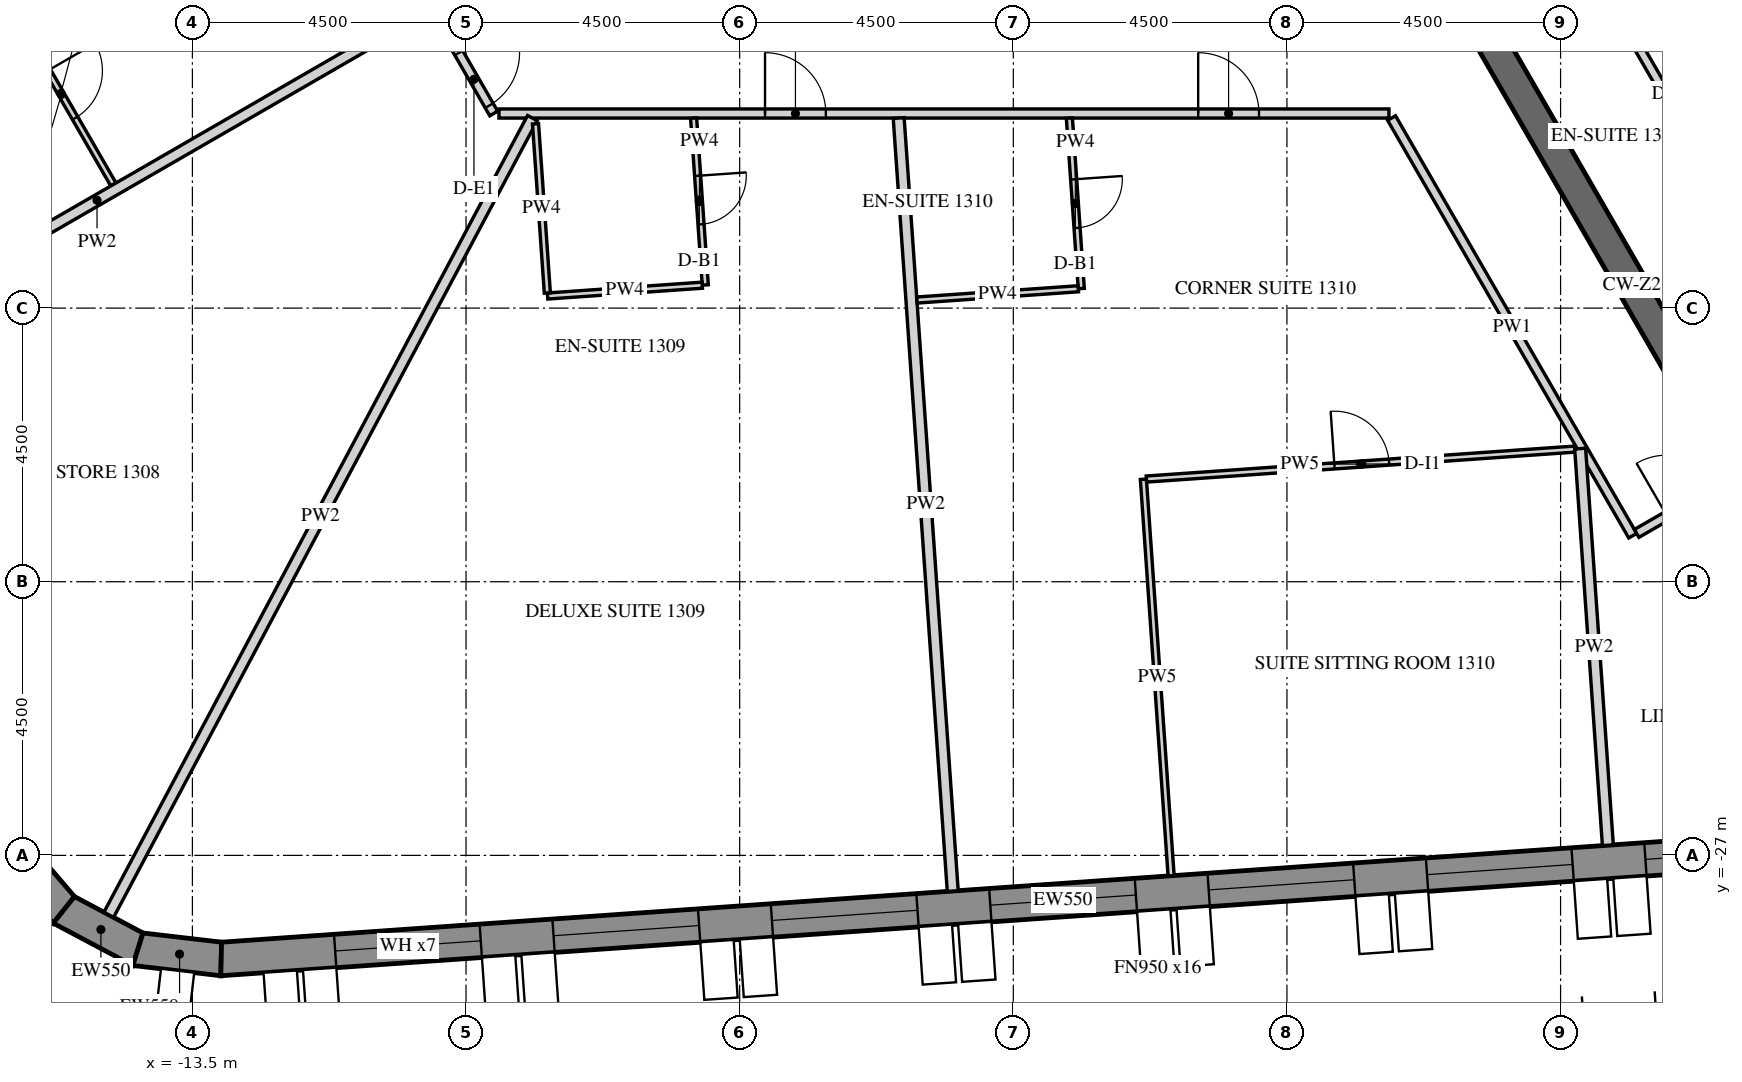
"""IFC4 building model, lengths in metres.
Left out: names, types, materials, properties, quantities, classifications, styles, units other than length and angle.
Written with IfcOpenShell. Run it as: python <this file> out.ifc"""

import sys

from ifc_helpers import new_model, si_unit, direction, frame, frame_2d, origin, place, context, subcontext, project, spatial, polyline, rectangle, outline, extrude, element, fill, save


model = new_model("IFC4")
c1 = context("Model", 3, precision=1e-05, world=origin(), true_north=direction((0.0, 1.0)))
c2 = subcontext(c1, "Body", "Model", "MODEL_VIEW")
j1 = project(units=[si_unit("LENGTHUNIT", "METRE"), si_unit("PLANEANGLEUNIT", "RADIAN")], contexts=[c1])
p1 = place(None, origin())
s1 = spatial("IfcSite", under=j1, at=p1, CompositionType="ELEMENT")
p2 = place(p1, origin())
s2 = spatial("IfcBuilding", under=s1, at=p2, CompositionType="ELEMENT")
p3 = place(p2, frame((0.0, 0.0, 176.1)))
s3 = spatial("IfcBuildingStorey", under=s2, at=p3, CompositionType="ELEMENT", Elevation=176.1)
p4 = place(p3, frame((-16.512, -26.85, -0.15), z_axis=(0.0, 0.0, 1.0), x_axis=(0.651621950847, -0.758543890078, 0.0)))
e1 = element("IfcWall", 1, at=p4, inside=s3, PredefinedType="SOLIDWALL", context=c2, shape_type="SweptSolid", body=[
    extrude(outline(polyline([(-0.026, -0.275), (1.431, -0.275), (1.327, 0.275), (0.026, 0.275), (-0.026, -0.275)])), origin(), (0.0, 0.0, 1.0), 3.9),
])
p5 = place(p3, frame((-15.614, -27.896, -0.15), z_axis=(0.0, 0.0, 1.0), x_axis=(0.882994189209, -0.469383917304, 0.0)))
e2 = element("IfcWall", 2, at=p5, inside=s3, PredefinedType="SOLIDWALL", context=c2, shape_type="SweptSolid", body=[
    extrude(outline(polyline([(-0.052, -0.275), (1.431, -0.275), (1.327, 0.275), (0.052, 0.275), (-0.052, -0.275)])), origin(), (0.0, 0.0, 1.0), 3.9),
])
p6 = place(p3, frame((-14.396, -28.543, -0.15), z_axis=(0.0, 0.0, 1.0), x_axis=(0.993232537394, -0.11614269956, 0.0)))
e3 = element("IfcWall", 3, at=p6, inside=s3, PredefinedType="SOLIDWALL", context=c2, shape_type="SweptSolid", body=[
    extrude(outline(polyline([(-0.052, -0.275), (1.405, -0.275), (1.353, 0.275), (0.052, 0.275), (-0.052, -0.275)])), origin(), (0.0, 0.0, 1.0), 3.9),
])
p7 = place(p3, frame((-13.026, -28.704, -0.15), z_axis=(0.0, 0.0, 1.0), x_axis=(0.99756406806, 0.069756219185, 0.0)))
e4 = element("IfcWall", 4, at=p7, inside=s3, PredefinedType="SOLIDWALL", context=c2, shape_type="SweptSolid", body=[
    extrude(outline(polyline([(-0.026, -0.275), (27.78, -0.275), (27.735, 0.275), (0.026, 0.275), (-0.026, -0.275)])), origin(), (0.0, 0.0, 1.0), 3.9),
])
p8 = place(p7, frame((1.879, 0.0, 1.05)))
e5 = element("IfcOpeningElement", 5, at=p8, cuts=e4, PredefinedType="OPENING", context=c2, shape_type="SweptSolid", body=[
    extrude(rectangle(XDim=2.4, YDim=2.4, at=frame_2d((1.2, 1.2))), frame((0.0, 0.285, 0.0), z_axis=(0.0, -1.0, 0.0), x_axis=(1.0, 0.0, 0.0)), (0.0, 0.0, 1.0), 0.57),
])
p9 = place(p7, frame((5.479, 0.0, 1.05)))
e6 = element("IfcOpeningElement", 6, at=p9, cuts=e4, PredefinedType="OPENING", context=c2, shape_type="SweptSolid", body=[
    extrude(rectangle(XDim=2.4, YDim=2.4, at=frame_2d((1.2, 1.2))), frame((0.0, 0.285, 0.0), z_axis=(0.0, -1.0, 0.0), x_axis=(1.0, 0.0, 0.0)), (0.0, 0.0, 1.0), 0.57),
])
p10 = place(p7, frame((9.079, 0.0, 1.05)))
e7 = element("IfcOpeningElement", 7, at=p10, cuts=e4, PredefinedType="OPENING", context=c2, shape_type="SweptSolid", body=[
    extrude(rectangle(XDim=2.4, YDim=2.4, at=frame_2d((1.2, 1.2))), frame((0.0, 0.285, 0.0), z_axis=(0.0, -1.0, 0.0), x_axis=(1.0, 0.0, 0.0)), (0.0, 0.0, 1.0), 0.57),
])
p11 = place(p7, frame((12.679, 0.0, 1.05)))
e8 = element("IfcOpeningElement", 8, at=p11, cuts=e4, PredefinedType="OPENING", context=c2, shape_type="SweptSolid", body=[
    extrude(rectangle(XDim=2.4, YDim=2.4, at=frame_2d((1.2, 1.2))), frame((0.0, 0.285, 0.0), z_axis=(0.0, -1.0, 0.0), x_axis=(1.0, 0.0, 0.0)), (0.0, 0.0, 1.0), 0.57),
])
p12 = place(p7, frame((16.279, 0.0, 1.05)))
e9 = element("IfcOpeningElement", 9, at=p12, cuts=e4, PredefinedType="OPENING", context=c2, shape_type="SweptSolid", body=[
    extrude(rectangle(XDim=2.4, YDim=2.4, at=frame_2d((1.2, 1.2))), frame((0.0, 0.285, 0.0), z_axis=(0.0, -1.0, 0.0), x_axis=(1.0, 0.0, 0.0)), (0.0, 0.0, 1.0), 0.57),
])
p13 = place(p7, frame((19.879, 0.0, 1.05)))
e10 = element("IfcOpeningElement", 10, at=p13, cuts=e4, PredefinedType="OPENING", context=c2, shape_type="SweptSolid", body=[
    extrude(rectangle(XDim=2.4, YDim=2.4, at=frame_2d((1.2, 1.2))), frame((0.0, 0.285, 0.0), z_axis=(0.0, -1.0, 0.0), x_axis=(1.0, 0.0, 0.0)), (0.0, 0.0, 1.0), 0.57),
])
p14 = place(p7, frame((23.479, 0.0, 1.05)))
e11 = element("IfcOpeningElement", 11, at=p14, cuts=e4, PredefinedType="OPENING", context=c2, shape_type="SweptSolid", body=[
    extrude(rectangle(XDim=2.4, YDim=2.4, at=frame_2d((1.2, 1.2))), frame((0.0, 0.285, 0.0), z_axis=(0.0, -1.0, 0.0), x_axis=(1.0, 0.0, 0.0)), (0.0, 0.0, 1.0), 0.57),
])
p15 = place(p3, frame((7.506, -13.0, -0.15), z_axis=(0.0, 0.0, 1.0), x_axis=(0.499988271576, -0.866032175087, 0.0)))
e12 = element("IfcWall", 12, at=p15, inside=s3, PredefinedType="SHEAR", context=c2, shape_type="SweptSolid", body=[
    extrude(rectangle(XDim=15.424, YDim=0.5, at=frame_2d((7.712, 0.0))), origin(), (0.0, 0.0, 1.0), 3.9),
])
p16 = place(p15, frame((6.812, 0.0, 0.15)))
e13 = element("IfcOpeningElement", 13, at=p16, cuts=e12, PredefinedType="OPENING", context=c2, shape_type="SweptSolid", body=[
    extrude(rectangle(XDim=1.8, YDim=2.4, at=frame_2d((0.9, 1.2))), frame((0.0, 0.26, 0.0), z_axis=(0.0, -1.0, 0.0), x_axis=(1.0, 0.0, 0.0)), (0.0, 0.0, 1.0), 0.52),
])
p17 = place(p3, frame((-14.921, -3.757, 0.0), z_axis=(0.0, 0.0, 1.0), x_axis=(0.500001980452, -0.866024260367, 0.0)))
e14 = element("IfcWall", 14, at=p17, inside=s3, PredefinedType="PARTITIONING", context=c2, shape_type="SweptSolid", body=[
    extrude(rectangle(XDim=12.752, YDim=0.15, at=frame_2d((6.376, 0.0))), origin(), (0.0, 0.0, 1.0), 2.988),
])
p18 = place(p17, frame((6.225, 0.0, 0.0)))
e15 = element("IfcOpeningElement", 15, at=p18, cuts=e14, PredefinedType="OPENING", context=c2, shape_type="SweptSolid", body=[
    extrude(rectangle(XDim=1.0, YDim=2.1, at=frame_2d((0.5, 1.05))), frame((0.0, 0.085, 0.0), z_axis=(0.0, -1.0, 0.0), x_axis=(1.0, 0.0, 0.0)), (0.0, 0.0, 1.0), 0.17),
])
p19 = place(p17, frame((11.602, 0.0, 0.0)))
e16 = element("IfcOpeningElement", 16, at=p19, cuts=e14, PredefinedType="OPENING", context=c2, shape_type="SweptSolid", body=[
    extrude(rectangle(XDim=1.0, YDim=2.1, at=frame_2d((0.5, 1.05))), frame((0.0, 0.085, 0.0), z_axis=(0.0, -1.0, 0.0), x_axis=(1.0, 0.0, 0.0)), (0.0, 0.0, 1.0), 0.17),
])
p20 = place(p3, frame((-8.458, -14.8, 0.0), z_axis=(0.0, 0.0, 1.0), x_axis=(1.0, 0.0, 0.0)))
e17 = element("IfcWall", 17, at=p20, inside=s3, PredefinedType="PARTITIONING", context=c2, shape_type="SweptSolid", body=[
    extrude(rectangle(XDim=14.636, YDim=0.15, at=frame_2d((7.318, 0.0))), origin(), (0.0, 0.0, 1.0), 2.988),
])
p21 = place(p20, frame((4.375, 0.0, 0.0)))
e18 = element("IfcOpeningElement", 18, at=p21, cuts=e17, PredefinedType="OPENING", context=c2, shape_type="SweptSolid", body=[
    extrude(rectangle(XDim=1.0, YDim=2.1, at=frame_2d((0.5, 1.05))), frame((0.0, 0.085, 0.0), z_axis=(0.0, -1.0, 0.0), x_axis=(1.0, 0.0, 0.0)), (0.0, 0.0, 1.0), 0.17),
])
p22 = place(p20, frame((11.499, 0.0, 0.0)))
e19 = element("IfcOpeningElement", 19, at=p22, cuts=e17, PredefinedType="OPENING", context=c2, shape_type="SweptSolid", body=[
    extrude(rectangle(XDim=1.0, YDim=2.1, at=frame_2d((0.5, 1.05))), frame((0.0, 0.085, 0.0), z_axis=(0.0, -1.0, 0.0), x_axis=(1.0, 0.0, 0.0)), (0.0, 0.0, 1.0), 0.17),
])
p23 = place(p3, frame((6.221, -14.875, 0.0), z_axis=(0.0, 0.0, 1.0), x_axis=(0.499989830942, -0.866031274813, 0.0)))
e20 = element("IfcWall", 20, at=p23, inside=s3, PredefinedType="PARTITIONING", context=c2, shape_type="SweptSolid", body=[
    extrude(rectangle(XDim=7.93, YDim=0.15, at=frame_2d((3.965, 0.0))), origin(), (0.0, 0.0, 1.0), 2.988),
])
p24 = place(p3, frame((10.251, -21.705, 0.0), z_axis=(0.0, 0.0, 1.0), x_axis=(0.866013532718, 0.500020560727, 0.0)))
e21 = element("IfcWall", 21, at=p24, inside=s3, PredefinedType="PARTITIONING", context=c2, shape_type="SweptSolid", body=[
    extrude(rectangle(XDim=1.725, YDim=0.15, at=frame_2d((0.863, 0.0))), origin(), (0.0, 0.0, 1.0), 2.988),
])
p25 = place(p24, frame((0.575, 0.0, 0.0)))
e22 = element("IfcOpeningElement", 22, at=p25, cuts=e21, PredefinedType="OPENING", context=c2, shape_type="SweptSolid", body=[
    extrude(rectangle(XDim=1.0, YDim=2.1, at=frame_2d((0.5, 1.05))), frame((0.0, 0.085, 0.0), z_axis=(0.0, -1.0, 0.0), x_axis=(1.0, 0.0, 0.0)), (0.0, 0.0, 1.0), 0.17),
])
p26 = place(p3, frame((13.699, -19.628, 0.0), z_axis=(0.0, 0.0, 1.0), x_axis=(-0.499998968938, 0.866025999068, 0.0)))
e23 = element("IfcWall", 23, at=p26, inside=s3, PredefinedType="PARTITIONING", context=c2, shape_type="SweptSolid", body=[
    extrude(rectangle(XDim=7.592, YDim=0.15, at=frame_2d((3.796, 0.0))), origin(), (0.0, 0.0, 1.0), 2.988),
])
p27 = place(p26, frame((2.233, 0.0, 0.0)))
e24 = element("IfcOpeningElement", 24, at=p27, cuts=e23, PredefinedType="OPENING", context=c2, shape_type="SweptSolid", body=[
    extrude(rectangle(XDim=1.0, YDim=2.1, at=frame_2d((0.5, 1.05))), frame((0.0, 0.085, 0.0), z_axis=(0.0, -1.0, 0.0), x_axis=(1.0, 0.0, 0.0)), (0.0, 0.0, 1.0), 0.17),
])
p28 = place(p3, frame((-16.529, -12.97, 0.0), z_axis=(0.0, 0.0, 1.0), x_axis=(0.499978980201, -0.866037539231, 0.0)))
e25 = element("IfcWall", 25, at=p28, inside=s3, PredefinedType="PARTITIONING", context=c2, shape_type="SweptSolid", body=[
    extrude(rectangle(XDim=3.46, YDim=0.1, at=frame_2d((1.73, 0.0))), origin(), (0.0, 0.0, 1.0), 2.988),
])
p29 = place(p28, frame((1.3, 0.0, 0.0)))
e26 = element("IfcOpeningElement", 26, at=p29, cuts=e25, PredefinedType="OPENING", context=c2, shape_type="SweptSolid", body=[
    extrude(rectangle(XDim=0.9, YDim=2.1, at=frame_2d((0.45, 1.05))), frame((0.0, 0.06, 0.0), z_axis=(0.0, -1.0, 0.0), x_axis=(1.0, 0.0, 0.0)), (0.0, 0.0, 1.0), 0.12),
])
p30 = place(p3, frame((-20.513, -19.37, 0.0), z_axis=(0.0, 0.0, 1.0), x_axis=(0.866019402111, 0.500010395058, 0.0)))
e27 = element("IfcWall", 27, at=p30, inside=s3, PredefinedType="PARTITIONING", context=c2, shape_type="SweptSolid", body=[
    extrude(rectangle(XDim=12.575, YDim=0.18, at=frame_2d((6.288, 0.0))), origin(), (0.0, 0.0, 1.0), 2.988),
])
p31 = place(p3, frame((-14.876, -27.977, 0.0), z_axis=(0.0, 0.0, 1.0), x_axis=(0.469475175214, 0.882945672088, 0.0)))
e28 = element("IfcWall", 28, at=p31, inside=s3, PredefinedType="PARTITIONING", context=c2, shape_type="SweptSolid", body=[
    extrude(rectangle(XDim=14.839, YDim=0.18, at=frame_2d((7.419, 0.0))), origin(), (0.0, 0.0, 1.0), 2.988),
])
p32 = place(p3, frame((-5.258, -14.875, 0.0), z_axis=(0.0, 0.0, 1.0), x_axis=(0.069828244755, -0.997559028947, 0.0)))
e29 = element("IfcWall", 29, at=p32, inside=s3, PredefinedType="PARTITIONING", context=c2, shape_type="SweptSolid", body=[
    extrude(rectangle(XDim=2.752, YDim=0.1, at=frame_2d((1.376, 0.0))), origin(), (0.0, 0.0, 1.0), 2.988),
])
p33 = place(p32, frame((0.952, 0.0, 0.0)))
e30 = element("IfcOpeningElement", 30, at=p33, cuts=e29, PredefinedType="OPENING", context=c2, shape_type="SweptSolid", body=[
    extrude(rectangle(XDim=0.8, YDim=2.1, at=frame_2d((0.4, 1.05))), frame((0.0, 0.06, 0.0), z_axis=(0.0, -1.0, 0.0), x_axis=(1.0, 0.0, 0.0)), (0.0, 0.0, 1.0), 0.12),
])
p34 = place(p3, frame((-5.116, -17.623, 0.0), z_axis=(0.0, 0.0, 1.0), x_axis=(-0.997561167558, -0.069797686069, 0.0)))
e31 = element("IfcWall", 31, at=p34, inside=s3, PredefinedType="PARTITIONING", context=c2, shape_type="SweptSolid", body=[
    extrude(rectangle(XDim=2.55, YDim=0.1, at=frame_2d((1.275, 0.0))), origin(), (0.0, 0.0, 1.0), 2.988),
])
p35 = place(p3, frame((-7.663, -17.751, 0.0), z_axis=(0.0, 0.0, 1.0), x_axis=(-0.069778595312, 0.997562503123, 0.0)))
e32 = element("IfcWall", 32, at=p35, inside=s3, PredefinedType="PARTITIONING", context=c2, shape_type="SweptSolid", body=[
    extrude(rectangle(XDim=2.789, YDim=0.1, at=frame_2d((1.394, 0.0))), origin(), (0.0, 0.0, 1.0), 2.988),
])
p36 = place(p3, frame((-0.996, -27.587, 0.0), z_axis=(0.0, 0.0, 1.0), x_axis=(-0.069758774678, 0.99756388936, 0.0)))
e33 = element("IfcWall", 33, at=p36, inside=s3, PredefinedType="PARTITIONING", context=c2, shape_type="SweptSolid", body=[
    extrude(rectangle(XDim=12.743, YDim=0.18, at=frame_2d((6.371, 0.0))), origin(), (0.0, 0.0, 1.0), 2.988),
])
p37 = place(p3, frame((0.922, -14.875, 0.0), z_axis=(0.0, 0.0, 1.0), x_axis=(0.069759103431, -0.997563866371, 0.0)))
e34 = element("IfcWall", 34, at=p37, inside=s3, PredefinedType="PARTITIONING", context=c2, shape_type="SweptSolid", body=[
    extrude(rectangle(XDim=2.81, YDim=0.1, at=frame_2d((1.405, 0.0))), origin(), (0.0, 0.0, 1.0), 2.988),
])
p38 = place(p37, frame((1.01, 0.0, 0.0)))
e35 = element("IfcOpeningElement", 35, at=p38, cuts=e34, PredefinedType="OPENING", context=c2, shape_type="SweptSolid", body=[
    extrude(rectangle(XDim=0.8, YDim=2.1, at=frame_2d((0.4, 1.05))), frame((0.0, 0.06, 0.0), z_axis=(0.0, -1.0, 0.0), x_axis=(1.0, 0.0, 0.0)), (0.0, 0.0, 1.0), 0.12),
])
p39 = place(p3, frame((1.068, -17.682, 0.0), z_axis=(0.0, 0.0, 1.0), x_axis=(-0.997564270717, -0.069753320981, 0.0)))
e36 = element("IfcWall", 36, at=p39, inside=s3, PredefinedType="PARTITIONING", context=c2, shape_type="SweptSolid", body=[
    extrude(rectangle(XDim=2.66, YDim=0.1, at=frame_2d((1.33, 0.0))), origin(), (0.0, 0.0, 1.0), 2.988),
])
p40 = place(p3, frame((2.595, -27.335, 0.0), z_axis=(0.0, 0.0, 1.0), x_axis=(-0.069771144576, 0.997563024267, 0.0)))
e37 = element("IfcWall", 37, at=p40, inside=s3, PredefinedType="PARTITIONING", context=c2, shape_type="SweptSolid", body=[
    extrude(rectangle(XDim=6.536, YDim=0.1, at=frame_2d((3.268, 0.0))), origin(), (0.0, 0.0, 1.0), 2.988),
])
p41 = place(p3, frame((2.189, -20.812, 0.0), z_axis=(0.0, 0.0, 1.0), x_axis=(0.997564480369, 0.06975032263, 0.0)))
e38 = element("IfcWall", 38, at=p41, inside=s3, PredefinedType="PARTITIONING", context=c2, shape_type="SweptSolid", body=[
    extrude(rectangle(XDim=7.06, YDim=0.1, at=frame_2d((3.53, 0.0))), origin(), (0.0, 0.0, 1.0), 2.988),
])
p42 = place(p41, frame((3.1, 0.0, 0.0)))
e39 = element("IfcOpeningElement", 39, at=p42, cuts=e38, PredefinedType="OPENING", context=c2, shape_type="SweptSolid", body=[
    extrude(rectangle(XDim=0.9, YDim=2.1, at=frame_2d((0.45, 1.05))), frame((0.0, 0.06, 0.0), z_axis=(0.0, -1.0, 0.0), x_axis=(1.0, 0.0, 0.0)), (0.0, 0.0, 1.0), 0.12),
])
p43 = place(p3, frame((9.778, -26.833, 0.0), z_axis=(0.0, 0.0, 1.0), x_axis=(-0.069750353544, 0.997564478207, 0.0)))
e40 = element("IfcWall", 40, at=p43, inside=s3, PredefinedType="PARTITIONING", context=c2, shape_type="SweptSolid", body=[
    extrude(rectangle(XDim=6.538, YDim=0.18, at=frame_2d((3.269, 0.0))), origin(), (0.0, 0.0, 1.0), 2.988),
])
p44 = place(p8, frame((0.0, 0.205, 0.0)))
e41 = element("IfcWindow", 41, at=p44, inside=s3, PartitioningType="DOUBLE_PANEL_VERTICAL", PredefinedType="WINDOW", context=c2, shape_type="SweptSolid", body=[
    extrude(rectangle(XDim=2.4, YDim=2.4, at=frame_2d((1.2, 1.2))), frame((0.0, 0.03, 0.0), z_axis=(0.0, -1.0, 0.0), x_axis=(1.0, 0.0, 0.0)), (0.0, 0.0, 1.0), 0.06),
])
fill(e5, e41)
p45 = place(p9, frame((0.0, 0.205, 0.0)))
e42 = element("IfcWindow", 42, at=p45, inside=s3, PartitioningType="DOUBLE_PANEL_VERTICAL", PredefinedType="WINDOW", context=c2, shape_type="SweptSolid", body=[
    extrude(rectangle(XDim=2.4, YDim=2.4, at=frame_2d((1.2, 1.2))), frame((0.0, 0.03, 0.0), z_axis=(0.0, -1.0, 0.0), x_axis=(1.0, 0.0, 0.0)), (0.0, 0.0, 1.0), 0.06),
])
fill(e6, e42)
p46 = place(p10, frame((0.0, 0.205, 0.0)))
e43 = element("IfcWindow", 43, at=p46, inside=s3, PartitioningType="DOUBLE_PANEL_VERTICAL", PredefinedType="WINDOW", context=c2, shape_type="SweptSolid", body=[
    extrude(rectangle(XDim=2.4, YDim=2.4, at=frame_2d((1.2, 1.2))), frame((0.0, 0.03, 0.0), z_axis=(0.0, -1.0, 0.0), x_axis=(1.0, 0.0, 0.0)), (0.0, 0.0, 1.0), 0.06),
])
fill(e7, e43)
p47 = place(p11, frame((0.0, 0.205, 0.0)))
e44 = element("IfcWindow", 44, at=p47, inside=s3, PartitioningType="DOUBLE_PANEL_VERTICAL", PredefinedType="WINDOW", context=c2, shape_type="SweptSolid", body=[
    extrude(rectangle(XDim=2.4, YDim=2.4, at=frame_2d((1.2, 1.2))), frame((0.0, 0.03, 0.0), z_axis=(0.0, -1.0, 0.0), x_axis=(1.0, 0.0, 0.0)), (0.0, 0.0, 1.0), 0.06),
])
fill(e8, e44)
p48 = place(p12, frame((0.0, 0.205, 0.0)))
e45 = element("IfcWindow", 45, at=p48, inside=s3, PartitioningType="DOUBLE_PANEL_VERTICAL", PredefinedType="WINDOW", context=c2, shape_type="SweptSolid", body=[
    extrude(rectangle(XDim=2.4, YDim=2.4, at=frame_2d((1.2, 1.2))), frame((0.0, 0.03, 0.0), z_axis=(0.0, -1.0, 0.0), x_axis=(1.0, 0.0, 0.0)), (0.0, 0.0, 1.0), 0.06),
])
fill(e9, e45)
p49 = place(p13, frame((0.0, 0.205, 0.0)))
e46 = element("IfcWindow", 46, at=p49, inside=s3, PartitioningType="DOUBLE_PANEL_VERTICAL", PredefinedType="WINDOW", context=c2, shape_type="SweptSolid", body=[
    extrude(rectangle(XDim=2.4, YDim=2.4, at=frame_2d((1.2, 1.2))), frame((0.0, 0.03, 0.0), z_axis=(0.0, -1.0, 0.0), x_axis=(1.0, 0.0, 0.0)), (0.0, 0.0, 1.0), 0.06),
])
fill(e10, e46)
p50 = place(p14, frame((0.0, 0.205, 0.0)))
e47 = element("IfcWindow", 47, at=p50, inside=s3, PartitioningType="DOUBLE_PANEL_VERTICAL", PredefinedType="WINDOW", context=c2, shape_type="SweptSolid", body=[
    extrude(rectangle(XDim=2.4, YDim=2.4, at=frame_2d((1.2, 1.2))), frame((0.0, 0.03, 0.0), z_axis=(0.0, -1.0, 0.0), x_axis=(1.0, 0.0, 0.0)), (0.0, 0.0, 1.0), 0.06),
])
fill(e11, e47)
p51 = place(p29, origin())
e48 = element("IfcDoor", 48, at=p51, inside=s3, OperationType="SINGLE_SWING_LEFT", PredefinedType="DOOR", context=c2, shape_type="SweptSolid", body=[
    extrude(rectangle(XDim=0.9, YDim=2.1, at=frame_2d((0.45, 1.05))), frame((0.0, 0.025, 0.0), z_axis=(0.0, -1.0, 0.0), x_axis=(1.0, 0.0, 0.0)), (0.0, 0.0, 1.0), 0.05),
])
fill(e26, e48)
p52 = place(p19, origin())
e49 = element("IfcDoor", 49, at=p52, inside=s3, OperationType="SINGLE_SWING_LEFT", PredefinedType="DOOR", context=c2, shape_type="SweptSolid", body=[
    extrude(rectangle(XDim=1.0, YDim=2.1, at=frame_2d((0.5, 1.05))), frame((0.0, 0.025, 0.0), z_axis=(0.0, -1.0, 0.0), x_axis=(1.0, 0.0, 0.0)), (0.0, 0.0, 1.0), 0.05),
])
fill(e16, e49)
p53 = place(p21, origin())
e50 = element("IfcDoor", 50, at=p53, inside=s3, OperationType="SINGLE_SWING_LEFT", PredefinedType="DOOR", context=c2, shape_type="SweptSolid", body=[
    extrude(rectangle(XDim=1.0, YDim=2.1, at=frame_2d((0.5, 1.05))), frame((0.0, 0.025, 0.0), z_axis=(0.0, -1.0, 0.0), x_axis=(1.0, 0.0, 0.0)), (0.0, 0.0, 1.0), 0.05),
])
fill(e18, e50)
p54 = place(p33, origin())
e51 = element("IfcDoor", 51, at=p54, inside=s3, OperationType="SINGLE_SWING_LEFT", PredefinedType="DOOR", context=c2, shape_type="SweptSolid", body=[
    extrude(rectangle(XDim=0.8, YDim=2.1, at=frame_2d((0.4, 1.05))), frame((0.0, 0.025, 0.0), z_axis=(0.0, -1.0, 0.0), x_axis=(1.0, 0.0, 0.0)), (0.0, 0.0, 1.0), 0.05),
])
fill(e30, e51)
p55 = place(p22, origin())
e52 = element("IfcDoor", 52, at=p55, inside=s3, OperationType="SINGLE_SWING_RIGHT", PredefinedType="DOOR", context=c2, shape_type="SweptSolid", body=[
    extrude(rectangle(XDim=1.0, YDim=2.1, at=frame_2d((0.5, 1.05))), frame((0.0, 0.025, 0.0), z_axis=(0.0, -1.0, 0.0), x_axis=(1.0, 0.0, 0.0)), (0.0, 0.0, 1.0), 0.05),
])
fill(e19, e52)
p56 = place(p38, origin())
e53 = element("IfcDoor", 53, at=p56, inside=s3, OperationType="SINGLE_SWING_RIGHT", PredefinedType="DOOR", context=c2, shape_type="SweptSolid", body=[
    extrude(rectangle(XDim=0.8, YDim=2.1, at=frame_2d((0.4, 1.05))), frame((0.0, 0.025, 0.0), z_axis=(0.0, -1.0, 0.0), x_axis=(1.0, 0.0, 0.0)), (0.0, 0.0, 1.0), 0.05),
])
fill(e35, e53)
p57 = place(p42, origin())
e54 = element("IfcDoor", 54, at=p57, inside=s3, OperationType="SINGLE_SWING_LEFT", PredefinedType="DOOR", context=c2, shape_type="SweptSolid", body=[
    extrude(rectangle(XDim=0.9, YDim=2.1, at=frame_2d((0.45, 1.05))), frame((0.0, 0.025, 0.0), z_axis=(0.0, -1.0, 0.0), x_axis=(1.0, 0.0, 0.0)), (0.0, 0.0, 1.0), 0.05),
])
fill(e39, e54)
save(model, sys.argv[1])
